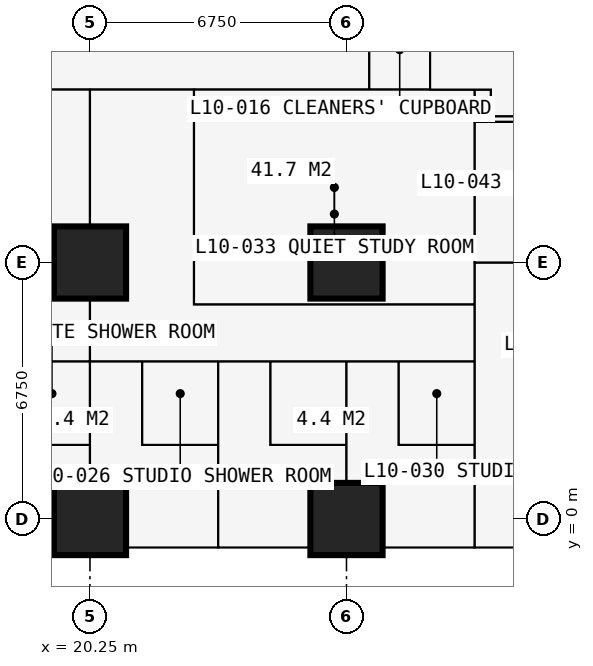
"""IFC4 building model, lengths in metres.
Left out: names, types, materials, properties, quantities, classifications, styles, units other than length and angle.
Written with IfcOpenShell. Run it as: python <this file> out.ifc"""

import sys

from ifc_helpers import new_model, si_unit, direction, frame, frame_2d, origin, origin_2d, place, context, subcontext, project, spatial, rectangle, extrude, element, fill, save


model = new_model("IFC4")
c1 = context("Model", 3, precision=1e-05, world=origin(), true_north=direction((0.0, 1.0)))
c2 = subcontext(c1, "Body", "Model", "MODEL_VIEW")
j1 = project(units=[si_unit("LENGTHUNIT", "METRE"), si_unit("PLANEANGLEUNIT", "RADIAN")], contexts=[c1])
p1 = place(None, origin())
s1 = spatial("IfcSite", under=j1, at=p1, CompositionType="ELEMENT")
p2 = place(p1, origin())
s2 = spatial("IfcBuilding", under=s1, at=p2, CompositionType="ELEMENT")
p3 = place(p2, frame((0.0, 0.0, 39.6)))
s3 = spatial("IfcBuildingStorey", under=s2, at=p3, CompositionType="ELEMENT", Elevation=39.6)
for number, where, z_axis, x_axis in (
    (1, (20.25, 0.0, 0.0), (0.0, 0.0, 1.0), (1.0, 0.0, 0.0)),
    (2, (20.25, 6.75, 0.0), (0.0, 0.0, 1.0), (1.0, 0.0, 0.0)),
    (3, (27.0, 0.0, 0.0), (0.0, 0.0, 1.0), (1.0, 0.0, 0.0)),
    (4, (27.0, 6.75, 0.0), (0.0, 0.0, 1.0), (1.0, 0.0, 0.0)),
):
    element("IfcColumn", number, at=place(p3, frame(where, z_axis=z_axis, x_axis=x_axis)), inside=s3, PredefinedType="COLUMN", context=c2, shape_type="SweptSolid", body=[
        extrude(rectangle(XDim=1.9, YDim=1.9, at=origin_2d()), origin(), (0.0, 0.0, 1.0), 3.6),
    ])
p4 = place(p3, frame((20.25, -0.75, 0.0), z_axis=(0.0, 0.0, 1.0), x_axis=(-1.0, 0.0, 0.0)))
e5 = element("IfcWall", 5, at=p4, inside=s3, PredefinedType="SOLIDWALL", context=c2, shape_type="SweptSolid", body=[
    extrude(rectangle(XDim=6.75, YDim=0.15, at=frame_2d((3.375, 0.0))), origin(), (0.0, 0.0, 1.0), 3.375),
])
p5 = place(p4, frame((0.996, 0.0, 0.0)))
e6 = element("IfcOpeningElement", 6, at=p5, cuts=e5, PredefinedType="OPENING", context=c2, shape_type="SweptSolid", body=[
    extrude(rectangle(XDim=1.0, YDim=2.2, at=frame_2d((0.5, 1.1))), frame((0.0, 0.085, 0.0), z_axis=(0.0, -1.0, 0.0), x_axis=(1.0, 0.0, 0.0)), (0.0, 0.0, 1.0), 0.17),
])
p6 = place(p4, frame((2.042, 0.0, 0.9)))
e7 = element("IfcOpeningElement", 7, at=p6, cuts=e5, PredefinedType="OPENING", context=c2, shape_type="SweptSolid", body=[
    extrude(rectangle(XDim=1.2, YDim=1.8, at=frame_2d((0.6, 0.9))), frame((0.0, 0.085, 0.0), z_axis=(0.0, -1.0, 0.0), x_axis=(1.0, 0.0, 0.0)), (0.0, 0.0, 1.0), 0.17),
])
p7 = place(p4, frame((4.754, 0.0, 0.0)))
e8 = element("IfcOpeningElement", 8, at=p7, cuts=e5, PredefinedType="OPENING", context=c2, shape_type="SweptSolid", body=[
    extrude(rectangle(XDim=1.0, YDim=2.2, at=frame_2d((0.5, 1.1))), frame((0.0, 0.085, 0.0), z_axis=(0.0, -1.0, 0.0), x_axis=(1.0, 0.0, 0.0)), (0.0, 0.0, 1.0), 0.17),
])
p8 = place(p4, frame((3.508, 0.0, 0.9)))
e9 = element("IfcOpeningElement", 9, at=p8, cuts=e5, PredefinedType="OPENING", context=c2, shape_type="SweptSolid", body=[
    extrude(rectangle(XDim=1.2, YDim=1.8, at=frame_2d((0.6, 0.9))), frame((0.0, 0.085, 0.0), z_axis=(0.0, -1.0, 0.0), x_axis=(1.0, 0.0, 0.0)), (0.0, 0.0, 1.0), 0.17),
])
p9 = place(p3, frame((6.75, 4.15, 0.0), z_axis=(0.0, 0.0, 1.0), x_axis=(1.0, 0.0, 0.0)))
e10 = element("IfcWall", 10, at=p9, inside=s3, PredefinedType="PARTITIONING", context=c2, shape_type="SweptSolid", body=[
    extrude(rectangle(XDim=23.625, YDim=0.1, at=frame_2d((11.812, 0.0))), origin(), (0.0, 0.0, 1.0), 3.375),
])
p10 = place(p9, frame((1.2, 0.0, 0.0)))
e11 = element("IfcOpeningElement", 11, at=p10, cuts=e10, PredefinedType="OPENING", context=c2, shape_type="SweptSolid", body=[
    extrude(rectangle(XDim=1.0, YDim=2.2, at=frame_2d((0.5, 1.1))), frame((0.0, 0.06, 0.0), z_axis=(0.0, -1.0, 0.0), x_axis=(1.0, 0.0, 0.0)), (0.0, 0.0, 1.0), 0.12),
])
p11 = place(p9, frame((3.575, 0.0, 0.0)))
e12 = element("IfcOpeningElement", 12, at=p11, cuts=e10, PredefinedType="OPENING", context=c2, shape_type="SweptSolid", body=[
    extrude(rectangle(XDim=0.95, YDim=2.2, at=frame_2d((0.475, 1.1))), frame((0.0, 0.06, 0.0), z_axis=(0.0, -1.0, 0.0), x_axis=(1.0, 0.0, 0.0)), (0.0, 0.0, 1.0), 0.12),
])
p12 = place(p9, frame((7.0, 0.0, 0.0)))
e13 = element("IfcOpeningElement", 13, at=p12, cuts=e10, PredefinedType="OPENING", context=c2, shape_type="SweptSolid", body=[
    extrude(rectangle(XDim=0.95, YDim=2.2, at=frame_2d((0.475, 1.1))), frame((0.0, 0.06, 0.0), z_axis=(0.0, -1.0, 0.0), x_axis=(1.0, 0.0, 0.0)), (0.0, 0.0, 1.0), 0.12),
])
p13 = place(p9, frame((10.375, 0.0, 0.0)))
e14 = element("IfcOpeningElement", 14, at=p13, cuts=e10, PredefinedType="OPENING", context=c2, shape_type="SweptSolid", body=[
    extrude(rectangle(XDim=0.95, YDim=2.2, at=frame_2d((0.475, 1.1))), frame((0.0, 0.06, 0.0), z_axis=(0.0, -1.0, 0.0), x_axis=(1.0, 0.0, 0.0)), (0.0, 0.0, 1.0), 0.12),
])
p14 = place(p9, frame((13.7, 0.0, 0.0)))
e15 = element("IfcOpeningElement", 15, at=p14, cuts=e10, PredefinedType="OPENING", context=c2, shape_type="SweptSolid", body=[
    extrude(rectangle(XDim=0.95, YDim=2.2, at=frame_2d((0.475, 1.1))), frame((0.0, 0.06, 0.0), z_axis=(0.0, -1.0, 0.0), x_axis=(1.0, 0.0, 0.0)), (0.0, 0.0, 1.0), 0.12),
])
p15 = place(p9, frame((17.125, 0.0, 0.0)))
e16 = element("IfcOpeningElement", 16, at=p15, cuts=e10, PredefinedType="OPENING", context=c2, shape_type="SweptSolid", body=[
    extrude(rectangle(XDim=0.95, YDim=2.2, at=frame_2d((0.475, 1.1))), frame((0.0, 0.06, 0.0), z_axis=(0.0, -1.0, 0.0), x_axis=(1.0, 0.0, 0.0)), (0.0, 0.0, 1.0), 0.12),
])
p16 = place(p9, frame((20.5, 0.0, 0.0)))
e17 = element("IfcOpeningElement", 17, at=p16, cuts=e10, PredefinedType="OPENING", context=c2, shape_type="SweptSolid", body=[
    extrude(rectangle(XDim=0.95, YDim=2.2, at=frame_2d((0.475, 1.1))), frame((0.0, 0.06, 0.0), z_axis=(0.0, -1.0, 0.0), x_axis=(1.0, 0.0, 0.0)), (0.0, 0.0, 1.0), 0.12),
])
p17 = place(p3, frame((10.125, 11.3, 0.0), z_axis=(0.0, 0.0, 1.0), x_axis=(1.0, 0.0, 0.0)))
e18 = element("IfcWall", 18, at=p17, inside=s3, PredefinedType="PARTITIONING", context=c2, shape_type="SweptSolid", body=[
    extrude(rectangle(XDim=20.675, YDim=0.15, at=frame_2d((10.337, 0.0))), origin(), (0.0, 0.0, 1.0), 3.375),
])
p18 = place(p17, frame((8.375, 0.0, 0.0)))
e19 = element("IfcOpeningElement", 19, at=p18, cuts=e18, PredefinedType="OPENING", context=c2, shape_type="SweptSolid", body=[
    extrude(rectangle(XDim=1.0, YDim=2.2, at=frame_2d((0.5, 1.1))), frame((0.0, 0.085, 0.0), z_axis=(0.0, -1.0, 0.0), x_axis=(1.0, 0.0, 0.0)), (0.0, 0.0, 1.0), 0.17),
])
p19 = place(p17, frame((10.975, 0.0, 0.0)))
e20 = element("IfcOpeningElement", 20, at=p19, cuts=e18, PredefinedType="OPENING", context=c2, shape_type="SweptSolid", body=[
    extrude(rectangle(XDim=1.0, YDim=2.2, at=frame_2d((0.5, 1.1))), frame((0.0, 0.085, 0.0), z_axis=(0.0, -1.0, 0.0), x_axis=(1.0, 0.0, 0.0)), (0.0, 0.0, 1.0), 0.17),
])
p20 = place(p17, frame((3.925, 0.0, 0.0)))
e21 = element("IfcOpeningElement", 21, at=p20, cuts=e18, PredefinedType="OPENING", context=c2, shape_type="SweptSolid", body=[
    extrude(rectangle(XDim=0.95, YDim=2.2, at=frame_2d((0.475, 1.1))), frame((0.0, 0.085, 0.0), z_axis=(0.0, -1.0, 0.0), x_axis=(1.0, 0.0, 0.0)), (0.0, 0.0, 1.0), 0.17),
])
p21 = place(p3, frame((18.25, 1.95, 0.0), z_axis=(0.0, 0.0, 1.0), x_axis=(1.0, 0.0, 0.0)))
e22 = element("IfcWall", 22, at=p21, inside=s3, PredefinedType="PARTITIONING", context=c2, shape_type="SweptSolid", body=[
    extrude(rectangle(XDim=2.0, YDim=0.1, at=frame_2d((1.0, 0.0))), origin(), (0.0, 0.0, 1.0), 3.375),
])
p22 = place(p3, frame((20.25, -0.734, 0.0), z_axis=(0.0, 0.0, 1.0), x_axis=(0.0, 1.0, 0.0)))
e23 = element("IfcWall", 23, at=p22, inside=s3, PredefinedType="PARTITIONING", context=c2, shape_type="SweptSolid", body=[
    extrude(rectangle(XDim=12.034, YDim=0.15, at=frame_2d((6.017, 0.0))), origin(), (0.0, 0.0, 1.0), 2.61),
])
p23 = place(p3, frame((21.625, 1.95, 0.0), z_axis=(0.0, 0.0, 1.0), x_axis=(0.0, 1.0, 0.0)))
e24 = element("IfcWall", 24, at=p23, inside=s3, PredefinedType="PARTITIONING", context=c2, shape_type="SweptSolid", body=[
    extrude(rectangle(XDim=2.2, YDim=0.1, at=frame_2d((1.1, 0.0))), origin(), (0.0, 0.0, 1.0), 3.375),
])
p24 = place(p23, frame((0.65, 0.0, 0.0)))
e25 = element("IfcOpeningElement", 25, at=p24, cuts=e24, PredefinedType="OPENING", context=c2, shape_type="SweptSolid", body=[
    extrude(rectangle(XDim=0.9, YDim=2.2, at=frame_2d((0.45, 1.1))), frame((0.0, 0.06, 0.0), z_axis=(0.0, -1.0, 0.0), x_axis=(1.0, 0.0, 0.0)), (0.0, 0.0, 1.0), 0.12),
])
p25 = place(p3, frame((21.625, 1.95, 0.0), z_axis=(0.0, 0.0, 1.0), x_axis=(1.0, 0.0, 0.0)))
e26 = element("IfcWall", 26, at=p25, inside=s3, PredefinedType="PARTITIONING", context=c2, shape_type="SweptSolid", body=[
    extrude(rectangle(XDim=2.0, YDim=0.1, at=frame_2d((1.0, 0.0))), origin(), (0.0, 0.0, 1.0), 3.375),
])
p26 = place(p3, frame((22.988, 5.65, 0.0), z_axis=(0.0, 0.0, 1.0), x_axis=(1.0, 0.0, 0.0)))
e27 = element("IfcWall", 27, at=p26, inside=s3, PredefinedType="PARTITIONING", context=c2, shape_type="SweptSolid", body=[
    extrude(rectangle(XDim=7.387, YDim=0.15, at=frame_2d((3.694, 0.0))), origin(), (0.0, 0.0, 1.0), 3.375),
])
p27 = place(p26, frame((2.1, 0.0, 0.0)))
e28 = element("IfcOpeningElement", 28, at=p27, cuts=e27, PredefinedType="OPENING", context=c2, shape_type="SweptSolid", body=[
    extrude(rectangle(XDim=0.95, YDim=2.2, at=frame_2d((0.475, 1.1))), frame((0.0, 0.085, 0.0), z_axis=(0.0, -1.0, 0.0), x_axis=(1.0, 0.0, 0.0)), (0.0, 0.0, 1.0), 0.17),
])
p28 = place(p3, frame((22.988, 5.65, 0.0), z_axis=(0.0, 0.0, 1.0), x_axis=(0.0, 1.0, 0.0)))
e29 = element("IfcWall", 29, at=p28, inside=s3, PredefinedType="PARTITIONING", context=c2, shape_type="SweptSolid", body=[
    extrude(rectangle(XDim=5.65, YDim=0.15, at=frame_2d((2.825, 0.0))), origin(), (0.0, 0.0, 1.0), 3.375),
])
p29 = place(p3, frame((23.625, -0.734, 0.0), z_axis=(0.0, 0.0, 1.0), x_axis=(0.0, 1.0, 0.0)))
e30 = element("IfcWall", 30, at=p29, inside=s3, PredefinedType="PARTITIONING", context=c2, shape_type="SweptSolid", body=[
    extrude(rectangle(XDim=4.884, YDim=0.175, at=frame_2d((2.442, 0.0))), origin(), (0.0, 0.0, 1.0), 3.375),
])
p30 = place(p3, frame((25.0, 1.95, 0.0), z_axis=(0.0, 0.0, 1.0), x_axis=(0.0, 1.0, 0.0)))
e31 = element("IfcWall", 31, at=p30, inside=s3, PredefinedType="PARTITIONING", context=c2, shape_type="SweptSolid", body=[
    extrude(rectangle(XDim=2.2, YDim=0.1, at=frame_2d((1.1, 0.0))), origin(), (0.0, 0.0, 1.0), 3.375),
])
p31 = place(p30, frame((0.65, 0.0, 0.0)))
e32 = element("IfcOpeningElement", 32, at=p31, cuts=e31, PredefinedType="OPENING", context=c2, shape_type="SweptSolid", body=[
    extrude(rectangle(XDim=0.9, YDim=2.2, at=frame_2d((0.45, 1.1))), frame((0.0, 0.06, 0.0), z_axis=(0.0, -1.0, 0.0), x_axis=(1.0, 0.0, 0.0)), (0.0, 0.0, 1.0), 0.12),
])
p32 = place(p3, frame((25.0, 1.95, 0.0), z_axis=(0.0, 0.0, 1.0), x_axis=(1.0, 0.0, 0.0)))
e33 = element("IfcWall", 33, at=p32, inside=s3, PredefinedType="PARTITIONING", context=c2, shape_type="SweptSolid", body=[
    extrude(rectangle(XDim=2.0, YDim=0.1, at=frame_2d((1.0, 0.0))), origin(), (0.0, 0.0, 1.0), 3.375),
])
p33 = place(p3, frame((27.0, -0.734, 0.0), z_axis=(0.0, 0.0, 1.0), x_axis=(0.0, 1.0, 0.0)))
e34 = element("IfcWall", 34, at=p33, inside=s3, PredefinedType="PARTITIONING", context=c2, shape_type="SweptSolid", body=[
    extrude(rectangle(XDim=4.884, YDim=0.175, at=frame_2d((2.442, 0.0))), origin(), (0.0, 0.0, 1.0), 2.61),
])
p34 = place(p3, frame((27.6, 11.3, 0.0), z_axis=(0.0, 0.0, 1.0), x_axis=(0.0, 1.0, 0.0)))
e35 = element("IfcWall", 35, at=p34, inside=s3, PredefinedType="PARTITIONING", context=c2, shape_type="SweptSolid", body=[
    extrude(rectangle(XDim=1.6, YDim=0.15, at=frame_2d((0.8, 0.0))), origin(), (0.0, 0.0, 1.0), 3.375),
])
p35 = place(p34, frame((0.3, 0.0, 0.0)))
e36 = element("IfcOpeningElement", 36, at=p35, cuts=e35, PredefinedType="OPENING", context=c2, shape_type="SweptSolid", body=[
    extrude(rectangle(XDim=0.95, YDim=2.2, at=frame_2d((0.475, 1.1))), frame((0.0, 0.085, 0.0), z_axis=(0.0, -1.0, 0.0), x_axis=(1.0, 0.0, 0.0)), (0.0, 0.0, 1.0), 0.17),
])
p36 = place(p3, frame((28.375, 1.95, 0.0), z_axis=(0.0, 0.0, 1.0), x_axis=(0.0, 1.0, 0.0)))
e37 = element("IfcWall", 37, at=p36, inside=s3, PredefinedType="PARTITIONING", context=c2, shape_type="SweptSolid", body=[
    extrude(rectangle(XDim=2.2, YDim=0.1, at=frame_2d((1.1, 0.0))), origin(), (0.0, 0.0, 1.0), 3.375),
])
p37 = place(p36, frame((0.65, 0.0, 0.0)))
e38 = element("IfcOpeningElement", 38, at=p37, cuts=e37, PredefinedType="OPENING", context=c2, shape_type="SweptSolid", body=[
    extrude(rectangle(XDim=0.9, YDim=2.2, at=frame_2d((0.45, 1.1))), frame((0.0, 0.06, 0.0), z_axis=(0.0, -1.0, 0.0), x_axis=(1.0, 0.0, 0.0)), (0.0, 0.0, 1.0), 0.12),
])
p38 = place(p3, frame((28.375, 1.95, 0.0), z_axis=(0.0, 0.0, 1.0), x_axis=(1.0, 0.0, 0.0)))
e39 = element("IfcWall", 39, at=p38, inside=s3, PredefinedType="PARTITIONING", context=c2, shape_type="SweptSolid", body=[
    extrude(rectangle(XDim=2.0, YDim=0.1, at=frame_2d((1.0, 0.0))), origin(), (0.0, 0.0, 1.0), 3.375),
])
p39 = place(p3, frame((29.2, 11.3, 0.0), z_axis=(0.0, 0.0, 1.0), x_axis=(0.0, 1.0, 0.0)))
e40 = element("IfcWall", 40, at=p39, inside=s3, PredefinedType="PARTITIONING", context=c2, shape_type="SweptSolid", body=[
    extrude(rectangle(XDim=17.9, YDim=0.2, at=frame_2d((8.95, 0.0))), origin(), (0.0, 0.0, 1.0), 3.375),
])
p40 = place(p39, frame((8.35, 0.0, 0.0)))
e41 = element("IfcOpeningElement", 41, at=p40, cuts=e40, PredefinedType="OPENING", context=c2, shape_type="SweptSolid", body=[
    extrude(rectangle(XDim=1.2, YDim=2.2, at=frame_2d((0.6, 1.1))), frame((0.0, 0.11, 0.0), z_axis=(0.0, -1.0, 0.0), x_axis=(1.0, 0.0, 0.0)), (0.0, 0.0, 1.0), 0.22),
])
p41 = place(p3, frame((30.375, -0.734, 0.0), z_axis=(0.0, 0.0, 1.0), x_axis=(0.0, 1.0, 0.0)))
e42 = element("IfcWall", 42, at=p41, inside=s3, PredefinedType="PARTITIONING", context=c2, shape_type="SweptSolid", body=[
    extrude(rectangle(XDim=12.034, YDim=0.15, at=frame_2d((6.017, 0.0))), origin(), (0.0, 0.0, 1.0), 3.375),
])
p42 = place(p41, frame((5.134, 0.0, 0.0)))
e43 = element("IfcOpeningElement", 43, at=p42, cuts=e42, PredefinedType="OPENING", context=c2, shape_type="SweptSolid", body=[
    extrude(rectangle(XDim=1.0, YDim=2.2, at=frame_2d((0.5, 1.1))), frame((0.0, 0.085, 0.0), z_axis=(0.0, -1.0, 0.0), x_axis=(1.0, 0.0, 0.0)), (0.0, 0.0, 1.0), 0.17),
])
p43 = place(p3, frame((30.375, 6.75, 0.0), z_axis=(0.0, 0.0, 1.0), x_axis=(1.0, 0.0, 0.0)))
e44 = element("IfcWall", 44, at=p43, inside=s3, PredefinedType="PARTITIONING", context=c2, shape_type="SweptSolid", body=[
    extrude(rectangle(XDim=5.975, YDim=0.15, at=frame_2d((2.988, 0.0))), origin(), (0.0, 0.0, 1.0), 2.877),
])
p44 = place(p3, frame((30.375, 10.45, 0.0), z_axis=(0.0, 0.0, 1.0), x_axis=(1.0, 0.0, 0.0)))
e45 = element("IfcWall", 45, at=p44, inside=s3, PredefinedType="PARTITIONING", context=c2, shape_type="SweptSolid", body=[
    extrude(rectangle(XDim=4.475, YDim=0.15, at=frame_2d((2.238, 0.0))), origin(), (0.0, 0.0, 1.0), 3.375),
])
p45 = place(p44, frame((2.35, 0.0, 0.0)))
e46 = element("IfcOpeningElement", 46, at=p45, cuts=e45, PredefinedType="OPENING", context=c2, shape_type="SweptSolid", body=[
    extrude(rectangle(XDim=0.95, YDim=2.2, at=frame_2d((0.475, 1.1))), frame((0.0, 0.085, 0.0), z_axis=(0.0, -1.0, 0.0), x_axis=(1.0, 0.0, 0.0)), (0.0, 0.0, 1.0), 0.17),
])
p46 = place(p3, frame((30.8, 10.6, 0.0), z_axis=(0.0, 0.0, 1.0), x_axis=(0.0, 1.0, 0.0)))
e47 = element("IfcWall", 47, at=p46, inside=s3, PredefinedType="PARTITIONING", context=c2, shape_type="SweptSolid", body=[
    extrude(rectangle(XDim=0.7, YDim=0.15, at=frame_2d((0.35, 0.0))), origin(), (0.0, 0.0, 1.0), 3.375),
])
p47 = place(p3, frame((30.8, 10.6, 0.0), z_axis=(0.0, 0.0, 1.0), x_axis=(1.0, 0.0, 0.0)))
e48 = element("IfcWall", 48, at=p47, inside=s3, PredefinedType="PARTITIONING", context=c2, shape_type="SweptSolid", body=[
    extrude(rectangle(XDim=1.85, YDim=0.15, at=frame_2d((0.925, 0.0))), origin(), (0.0, 0.0, 1.0), 3.375),
])
p48 = place(p5, origin())
e49 = element("IfcDoor", 49, at=p48, inside=s3, OperationType="SINGLE_SWING_LEFT", PredefinedType="DOOR", context=c2, shape_type="SweptSolid", body=[
    extrude(rectangle(XDim=1.0, YDim=2.2, at=frame_2d((0.5, 1.1))), frame((0.0, 0.025, 0.0), z_axis=(0.0, -1.0, 0.0), x_axis=(1.0, 0.0, 0.0)), (0.0, 0.0, 1.0), 0.05),
])
fill(e6, e49)
p49 = place(p35, origin())
e50 = element("IfcDoor", 50, at=p49, inside=s3, OperationType="SINGLE_SWING_LEFT", PredefinedType="DOOR", context=c2, shape_type="SweptSolid", body=[
    extrude(rectangle(XDim=0.95, YDim=2.2, at=frame_2d((0.475, 1.1))), frame((0.0, 0.025, 0.0), z_axis=(0.0, -1.0, 0.0), x_axis=(1.0, 0.0, 0.0)), (0.0, 0.0, 1.0), 0.05),
])
fill(e36, e50)
p50 = place(p18, origin())
e51 = element("IfcDoor", 51, at=p50, inside=s3, OperationType="SINGLE_SWING_LEFT", PredefinedType="DOOR", context=c2, shape_type="SweptSolid", body=[
    extrude(rectangle(XDim=1.0, YDim=2.2, at=frame_2d((0.5, 1.1))), frame((0.0, 0.025, 0.0), z_axis=(0.0, -1.0, 0.0), x_axis=(1.0, 0.0, 0.0)), (0.0, 0.0, 1.0), 0.05),
])
fill(e19, e51)
p51 = place(p14, origin())
e52 = element("IfcDoor", 52, at=p51, inside=s3, OperationType="SINGLE_SWING_LEFT", PredefinedType="DOOR", context=c2, shape_type="SweptSolid", body=[
    extrude(rectangle(XDim=0.95, YDim=2.2, at=frame_2d((0.475, 1.1))), frame((0.0, 0.025, 0.0), z_axis=(0.0, -1.0, 0.0), x_axis=(1.0, 0.0, 0.0)), (0.0, 0.0, 1.0), 0.05),
])
fill(e15, e52)
p52 = place(p24, origin())
e53 = element("IfcDoor", 53, at=p52, inside=s3, OperationType="SINGLE_SWING_RIGHT", PredefinedType="DOOR", context=c2, shape_type="SweptSolid", body=[
    extrude(rectangle(XDim=0.9, YDim=2.2, at=frame_2d((0.45, 1.1))), frame((0.0, 0.025, 0.0), z_axis=(0.0, -1.0, 0.0), x_axis=(1.0, 0.0, 0.0)), (0.0, 0.0, 1.0), 0.05),
])
fill(e25, e53)
p53 = place(p15, origin())
e54 = element("IfcDoor", 54, at=p53, inside=s3, OperationType="SINGLE_SWING_LEFT", PredefinedType="DOOR", context=c2, shape_type="SweptSolid", body=[
    extrude(rectangle(XDim=0.95, YDim=2.2, at=frame_2d((0.475, 1.1))), frame((0.0, 0.025, 0.0), z_axis=(0.0, -1.0, 0.0), x_axis=(1.0, 0.0, 0.0)), (0.0, 0.0, 1.0), 0.05),
])
fill(e16, e54)
p54 = place(p31, origin())
e55 = element("IfcDoor", 55, at=p54, inside=s3, OperationType="SINGLE_SWING_RIGHT", PredefinedType="DOOR", context=c2, shape_type="SweptSolid", body=[
    extrude(rectangle(XDim=0.9, YDim=2.2, at=frame_2d((0.45, 1.1))), frame((0.0, 0.025, 0.0), z_axis=(0.0, -1.0, 0.0), x_axis=(1.0, 0.0, 0.0)), (0.0, 0.0, 1.0), 0.05),
])
fill(e32, e55)
p55 = place(p16, origin())
e56 = element("IfcDoor", 56, at=p55, inside=s3, OperationType="SINGLE_SWING_LEFT", PredefinedType="DOOR", context=c2, shape_type="SweptSolid", body=[
    extrude(rectangle(XDim=0.95, YDim=2.2, at=frame_2d((0.475, 1.1))), frame((0.0, 0.025, 0.0), z_axis=(0.0, -1.0, 0.0), x_axis=(1.0, 0.0, 0.0)), (0.0, 0.0, 1.0), 0.05),
])
fill(e17, e56)
p56 = place(p37, origin())
e57 = element("IfcDoor", 57, at=p56, inside=s3, OperationType="SINGLE_SWING_RIGHT", PredefinedType="DOOR", context=c2, shape_type="SweptSolid", body=[
    extrude(rectangle(XDim=0.9, YDim=2.2, at=frame_2d((0.45, 1.1))), frame((0.0, 0.025, 0.0), z_axis=(0.0, -1.0, 0.0), x_axis=(1.0, 0.0, 0.0)), (0.0, 0.0, 1.0), 0.05),
])
fill(e38, e57)
p57 = place(p19, origin())
e58 = element("IfcDoor", 58, at=p57, inside=s3, OperationType="SINGLE_SWING_LEFT", PredefinedType="DOOR", context=c2, shape_type="SweptSolid", body=[
    extrude(rectangle(XDim=1.0, YDim=2.2, at=frame_2d((0.5, 1.1))), frame((0.0, 0.025, 0.0), z_axis=(0.0, -1.0, 0.0), x_axis=(1.0, 0.0, 0.0)), (0.0, 0.0, 1.0), 0.05),
])
fill(e20, e58)
p58 = place(p27, origin())
e59 = element("IfcDoor", 59, at=p58, inside=s3, OperationType="SINGLE_SWING_LEFT", PredefinedType="DOOR", context=c2, shape_type="SweptSolid", body=[
    extrude(rectangle(XDim=0.95, YDim=2.2, at=frame_2d((0.475, 1.1))), frame((0.0, 0.025, 0.0), z_axis=(0.0, -1.0, 0.0), x_axis=(1.0, 0.0, 0.0)), (0.0, 0.0, 1.0), 0.05),
])
fill(e28, e59)
p59 = place(p42, origin())
e60 = element("IfcDoor", 60, at=p59, inside=s3, OperationType="SINGLE_SWING_LEFT", PredefinedType="DOOR", context=c2, shape_type="SweptSolid", body=[
    extrude(rectangle(XDim=1.0, YDim=2.2, at=frame_2d((0.5, 1.1))), frame((0.0, 0.025, 0.0), z_axis=(0.0, -1.0, 0.0), x_axis=(1.0, 0.0, 0.0)), (0.0, 0.0, 1.0), 0.05),
])
fill(e43, e60)
save(model, sys.argv[1])
